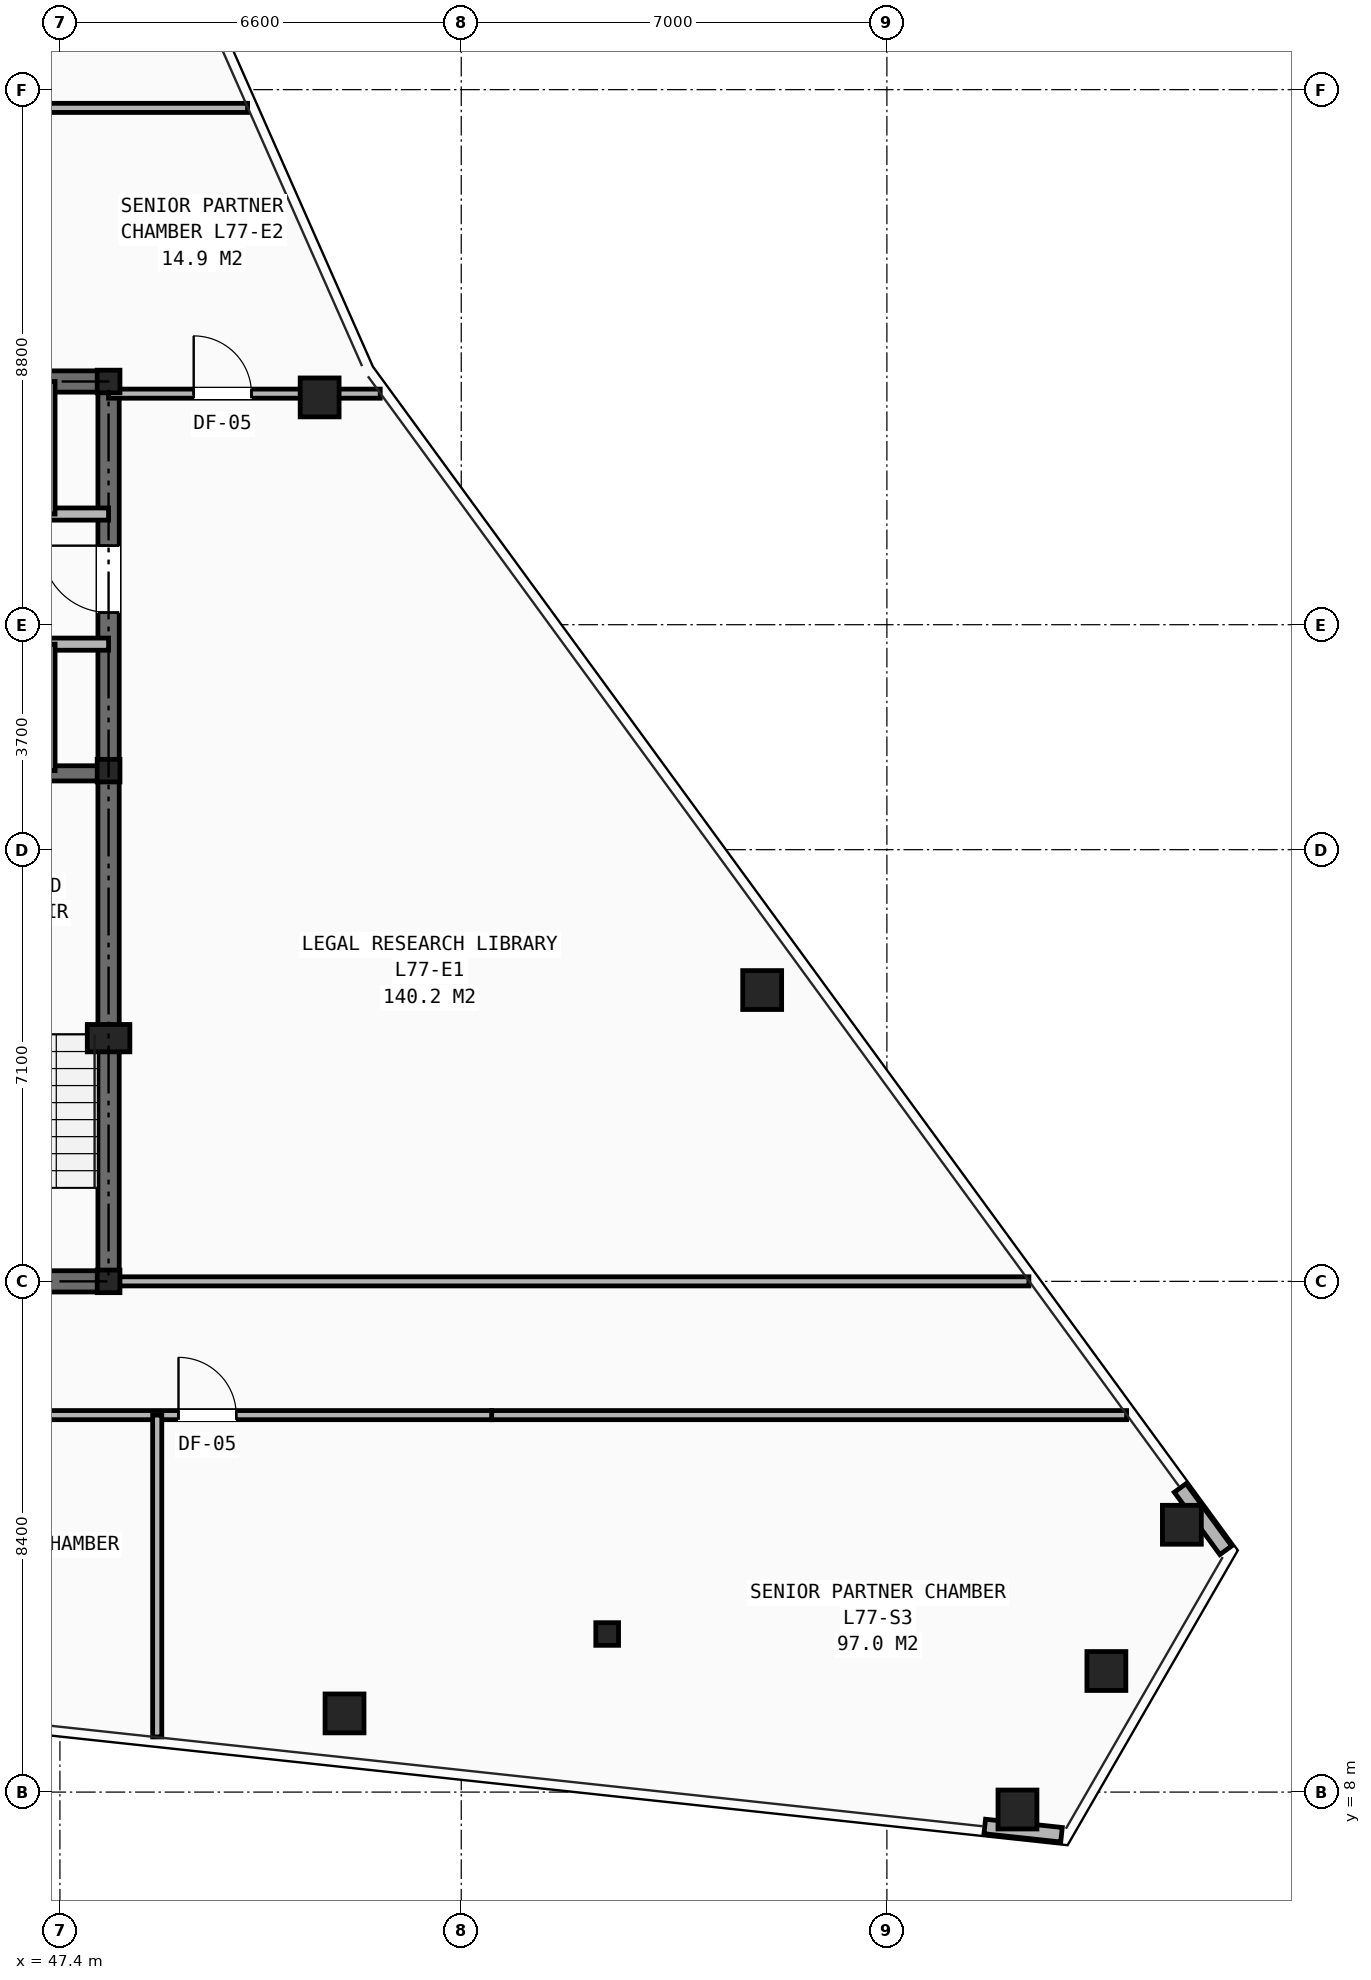
"""IFC4 building model, lengths in metres.
Left out: names, types, materials, properties, quantities, classifications, styles, units other than length and angle.
Written with IfcOpenShell. Run it as: python <this file> out.ifc"""

import sys

from ifc_helpers import new_model, si_unit, direction, frame, frame_2d, origin, origin_2d, place, context, subcontext, project, spatial, rectangle, hollow_rectangle, i_section, extrude, element, fill, save


model = new_model("IFC4")
c1 = context("Model", 3, precision=1e-05, world=origin(), true_north=direction((0.0, 1.0)))
c2 = subcontext(c1, "Body", "Model", "MODEL_VIEW")
j1 = project(units=[si_unit("LENGTHUNIT", "METRE"), si_unit("PLANEANGLEUNIT", "RADIAN")], contexts=[c1])
p1 = place(None, origin())
s1 = spatial("IfcSite", under=j1, at=p1, CompositionType="ELEMENT")
p2 = place(p1, origin())
s2 = spatial("IfcBuilding", under=s1, at=p2, CompositionType="ELEMENT")
p3 = place(p2, frame((0.0, 0.0, 272.5)))
s3 = spatial("IfcBuildingStorey", under=s2, at=p3, CompositionType="ELEMENT", Elevation=272.5)
for number, where, z_axis, x_axis in (
    (1, (48.2, 16.4, 0.0), (0.0, 0.0, 1.0), (1.0, 0.0, 0.0)),
    (2, (48.2, 24.8, 0.0), (0.0, 0.0, 1.0), (1.0, 0.0, 0.0)),
    (3, (48.2, 31.2, 0.0), (0.0, 0.0, 1.0), (1.0, 0.0, 0.0)),
    (4, (56.4, 10.6, 0.0), (0.0, 0.0, 1.0), (1.0, 0.0, 0.0)),
):
    element("IfcColumn", number, at=place(p3, frame(where, z_axis=z_axis, x_axis=x_axis)), inside=s3, PredefinedType="COLUMN", context=c2, shape_type="SweptSolid", body=[
        extrude(i_section(OverallWidth=0.374, OverallDepth=0.372, WebThickness=0.016, FlangeThickness=0.026, at=origin_2d()), origin(), (0.0, 0.0, 1.0), 3.5),
    ])
p4 = place(p3, frame((48.2, 20.4, 0.0), z_axis=(0.0, 0.0, 1.0), x_axis=(1.0, 0.0, 0.0)))
e5 = element("IfcColumn", 5, at=p4, inside=s3, PredefinedType="PILASTER", context=c2, shape_type="SweptSolid", body=[
    extrude(rectangle(XDim=0.7, YDim=0.45, at=origin_2d()), origin(), (0.0, 0.0, 1.0), 3.5),
])
for number, where, z_axis, x_axis in (
    (6, (52.08, 9.294, 0.0), (0.0, 0.0, 1.0), (1.0, 0.0, 0.0)),
    (7, (63.148, 7.714, 0.0), (0.0, 0.0, 1.0), (1.0, 0.0, 0.0)),
    (8, (64.61, 9.991, 0.0), (0.0, 0.0, 1.0), (1.0, 0.0, 0.0)),
    (9, (65.851, 12.397, 0.0), (0.0, 0.0, 1.0), (1.0, 0.0, 0.0)),
    (10, (58.949, 21.191, 0.0), (0.0, 0.0, 1.0), (1.0, 0.0, 0.0)),
    (11, (51.671, 30.938, 0.0), (0.0, 0.0, 1.0), (1.0, 0.0, 0.0)),
):
    element("IfcColumn", number, at=place(p3, frame(where, z_axis=z_axis, x_axis=x_axis)), inside=s3, PredefinedType="COLUMN", context=c2, shape_type="SweptSolid", body=[
        extrude(hollow_rectangle(XDim=0.64, YDim=0.64, WallThickness=0.045, at=origin_2d()), origin(), (0.0, 0.0, 1.0), 3.5),
    ])
for number, where, z_axis, x_axis in (
    (12, (62.61, 7.435, 0.0), (0.0, 0.0, 1.0), (0.994, -0.107, 0.0)),
    (13, (66.573, 11.977, 0.0), (0.0, 0.0, 1.0), (-0.59, 0.807, 0.0)),
):
    element("IfcWall", number, at=place(p3, frame(where, z_axis=z_axis, x_axis=x_axis)), inside=s3, PredefinedType="SHEAR", context=c2, shape_type="SweptSolid", body=[
        extrude(rectangle(XDim=1.269, YDim=0.24, at=frame_2d((0.635, 0.0))), origin(), (0.0, 0.0, 1.0), 2.623),
    ])
p5 = place(p3, frame((31.8, 16.4, 0.0), z_axis=(0.0, 0.0, 1.0), x_axis=(1.0, 0.0, 0.0)))
e14 = element("IfcWall", 14, at=p5, inside=s3, PredefinedType="SHEAR", context=c2, shape_type="SweptSolid", body=[
    extrude(rectangle(XDim=16.4, YDim=0.35, at=frame_2d((8.2, 0.0))), origin(), (0.0, 0.0, 1.0), 3.25),
])
p6 = place(p5, frame((4.2, 0.0, 0.0)))
e15 = element("IfcOpeningElement", 15, at=p6, cuts=e14, PredefinedType="OPENING", context=c2, shape_type="SweptSolid", body=[
    extrude(rectangle(XDim=0.95, YDim=2.1, at=frame_2d((0.475, 1.05))), frame((0.0, 0.185, 0.0), z_axis=(0.0, -1.0, 0.0), x_axis=(1.0, 0.0, 0.0)), (0.0, 0.0, 1.0), 0.37),
])
p7 = place(p5, frame((10.6, 0.0, 0.0)))
e16 = element("IfcOpeningElement", 16, at=p7, cuts=e14, PredefinedType="OPENING", context=c2, shape_type="SweptSolid", body=[
    extrude(rectangle(XDim=0.95, YDim=2.1, at=frame_2d((0.475, 1.05))), frame((0.0, 0.185, 0.0), z_axis=(0.0, -1.0, 0.0), x_axis=(1.0, 0.0, 0.0)), (0.0, 0.0, 1.0), 0.37),
])
p8 = place(p3, frame((31.8, 31.2, 0.0), z_axis=(0.0, 0.0, 1.0), x_axis=(1.0, 0.0, 0.0)))
e17 = element("IfcWall", 17, at=p8, inside=s3, PredefinedType="SHEAR", context=c2, shape_type="SweptSolid", body=[
    extrude(rectangle(XDim=16.4, YDim=0.35, at=frame_2d((8.2, 0.0))), origin(), (0.0, 0.0, 1.0), 3.25),
])
p9 = place(p3, frame((48.2, 16.4, 0.0), z_axis=(0.0, 0.0, 1.0), x_axis=(0.0, 1.0, 0.0)))
e18 = element("IfcWall", 18, at=p9, inside=s3, PredefinedType="SHEAR", context=c2, shape_type="SweptSolid", body=[
    extrude(rectangle(XDim=14.8, YDim=0.35, at=frame_2d((7.4, 0.0))), origin(), (0.0, 0.0, 1.0), 3.25),
])
p10 = place(p9, frame((11.0, 0.0, 0.0)))
e19 = element("IfcOpeningElement", 19, at=p10, cuts=e18, PredefinedType="OPENING", context=c2, shape_type="SweptSolid", body=[
    extrude(rectangle(XDim=1.1, YDim=2.15, at=frame_2d((0.55, 1.075))), frame((0.0, 0.185, 0.0), z_axis=(0.0, -1.0, 0.0), x_axis=(1.0, 0.0, 0.0)), (0.0, 0.0, 1.0), 0.37),
])
p11 = place(p3, frame((44.955, 24.755, 0.0), z_axis=(0.0, 0.0, 1.0), x_axis=(1.0, 0.0, 0.0)))
e20 = element("IfcWall", 20, at=p11, inside=s3, PredefinedType="SHEAR", context=c2, shape_type="SweptSolid", body=[
    extrude(rectangle(XDim=3.245, YDim=0.25, at=frame_2d((1.623, 0.0))), origin(), (0.0, 0.0, 1.0), 3.25),
])
p12 = place(p3, frame((33.82, 29.02, 0.0), z_axis=(0.0, 0.0, 1.0), x_axis=(1.0, 0.0, 0.0)))
e21 = element("IfcWall", 21, at=p12, inside=s3, PredefinedType="SOLIDWALL", context=c2, shape_type="SweptSolid", body=[
    extrude(rectangle(XDim=14.38, YDim=0.2, at=frame_2d((7.19, 0.0))), origin(), (0.0, 0.0, 1.0), 2.705),
])
p13 = place(p12, frame((3.92, 0.0, 0.0)))
e22 = element("IfcOpeningElement", 22, at=p13, cuts=e21, PredefinedType="OPENING", context=c2, shape_type="SweptSolid", body=[
    extrude(rectangle(XDim=0.9, YDim=2.1, at=frame_2d((0.45, 1.05))), frame((0.0, 0.11, 0.0), z_axis=(0.0, -1.0, 0.0), x_axis=(1.0, 0.0, 0.0)), (0.0, 0.0, 1.0), 0.22),
])
p14 = place(p12, frame((9.39, 0.0, 0.0)))
e23 = element("IfcOpeningElement", 23, at=p14, cuts=e21, PredefinedType="OPENING", context=c2, shape_type="SweptSolid", body=[
    extrude(rectangle(XDim=1.1, YDim=2.15, at=frame_2d((0.55, 1.075))), frame((0.0, 0.11, 0.0), z_axis=(0.0, -1.0, 0.0), x_axis=(1.0, 0.0, 0.0)), (0.0, 0.0, 1.0), 0.22),
])
p15 = place(p12, frame((11.71, 0.0, 0.0)))
e24 = element("IfcOpeningElement", 24, at=p15, cuts=e21, PredefinedType="OPENING", context=c2, shape_type="SweptSolid", body=[
    extrude(rectangle(XDim=1.1, YDim=2.15, at=frame_2d((0.55, 1.075))), frame((0.0, 0.11, 0.0), z_axis=(0.0, -1.0, 0.0), x_axis=(1.0, 0.0, 0.0)), (0.0, 0.0, 1.0), 0.22),
])
p16 = place(p3, frame((33.82, 26.88, 0.0), z_axis=(0.0, 0.0, 1.0), x_axis=(1.0, 0.0, 0.0)))
e25 = element("IfcWall", 25, at=p16, inside=s3, PredefinedType="SOLIDWALL", context=c2, shape_type="SweptSolid", body=[
    extrude(rectangle(XDim=14.38, YDim=0.2, at=frame_2d((7.19, 0.0))), origin(), (0.0, 0.0, 1.0), 2.705),
])
p17 = place(p16, frame((1.78, 0.0, 0.0)))
e26 = element("IfcOpeningElement", 26, at=p17, cuts=e25, PredefinedType="OPENING", context=c2, shape_type="SweptSolid", body=[
    extrude(rectangle(XDim=0.9, YDim=2.1, at=frame_2d((0.45, 1.05))), frame((0.0, 0.11, 0.0), z_axis=(0.0, -1.0, 0.0), x_axis=(1.0, 0.0, 0.0)), (0.0, 0.0, 1.0), 0.22),
])
p18 = place(p16, frame((6.07, 0.0, 0.0)))
e27 = element("IfcOpeningElement", 27, at=p18, cuts=e25, PredefinedType="OPENING", context=c2, shape_type="SweptSolid", body=[
    extrude(rectangle(XDim=0.9, YDim=2.1, at=frame_2d((0.45, 1.05))), frame((0.0, 0.11, 0.0), z_axis=(0.0, -1.0, 0.0), x_axis=(1.0, 0.0, 0.0)), (0.0, 0.0, 1.0), 0.22),
])
p19 = place(p16, frame((9.39, 0.0, 0.0)))
e28 = element("IfcOpeningElement", 28, at=p19, cuts=e25, PredefinedType="OPENING", context=c2, shape_type="SweptSolid", body=[
    extrude(rectangle(XDim=1.1, YDim=2.15, at=frame_2d((0.55, 1.075))), frame((0.0, 0.11, 0.0), z_axis=(0.0, -1.0, 0.0), x_axis=(1.0, 0.0, 0.0)), (0.0, 0.0, 1.0), 0.22),
])
p20 = place(p16, frame((11.71, 0.0, 0.0)))
e29 = element("IfcOpeningElement", 29, at=p20, cuts=e25, PredefinedType="OPENING", context=c2, shape_type="SweptSolid", body=[
    extrude(rectangle(XDim=1.1, YDim=2.15, at=frame_2d((0.55, 1.075))), frame((0.0, 0.11, 0.0), z_axis=(0.0, -1.0, 0.0), x_axis=(1.0, 0.0, 0.0)), (0.0, 0.0, 1.0), 0.22),
])
p21 = place(p3, frame((47.24, 29.02, 0.0), z_axis=(0.0, 0.0, 1.0), x_axis=(0.0, 1.0, 0.0)))
e30 = element("IfcWall", 30, at=p21, inside=s3, PredefinedType="SOLIDWALL", context=c2, shape_type="SweptSolid", body=[
    extrude(rectangle(XDim=2.18, YDim=0.16, at=frame_2d((1.09, 0.0))), origin(), (0.0, 0.0, 1.0), 2.705),
])
p22 = place(p3, frame((47.24, 24.8, 0.0), z_axis=(0.0, 0.0, 1.0), x_axis=(0.0, 1.0, 0.0)))
e31 = element("IfcWall", 31, at=p22, inside=s3, PredefinedType="SOLIDWALL", context=c2, shape_type="SweptSolid", body=[
    extrude(rectangle(XDim=2.08, YDim=0.16, at=frame_2d((1.04, 0.0))), origin(), (0.0, 0.0, 1.0), 3.25),
])
p23 = place(p3, frame((54.5, 14.2, 0.0), z_axis=(0.0, 0.0, 1.0), x_axis=(1.0, 0.0, 0.0)))
e32 = element("IfcWall", 32, at=p23, inside=s3, PredefinedType="PARTITIONING", context=c2, shape_type="SweptSolid", body=[
    extrude(rectangle(XDim=10.443, YDim=0.15, at=frame_2d((5.221, 0.0))), origin(), (0.0, 0.0, 1.0), 2.265),
])
p24 = place(p3, frame((48.2, 16.4, 0.0), z_axis=(0.0, 0.0, 1.0), x_axis=(1.0, 0.0, 0.0)))
e33 = element("IfcWall", 33, at=p24, inside=s3, PredefinedType="PARTITIONING", context=c2, shape_type="SweptSolid", body=[
    extrude(rectangle(XDim=15.135, YDim=0.15, at=frame_2d((7.568, 0.0))), origin(), (0.0, 0.0, 1.0), 2.265),
])
p25 = place(p3, frame((25.5, 14.2, 0.0), z_axis=(0.0, 0.0, 1.0), x_axis=(1.0, 0.0, 0.0)))
e34 = element("IfcWall", 34, at=p25, inside=s3, PredefinedType="PARTITIONING", context=c2, shape_type="SweptSolid", body=[
    extrude(rectangle(XDim=29.0, YDim=0.15, at=frame_2d((14.5, 0.0))), origin(), (0.0, 0.0, 1.0), 2.265),
])
p26 = place(p25, frame((0.85, 0.0, 0.0)))
e35 = element("IfcOpeningElement", 35, at=p26, cuts=e34, PredefinedType="OPENING", context=c2, shape_type="SweptSolid", body=[
    extrude(rectangle(XDim=0.95, YDim=2.1, at=frame_2d((0.475, 1.05))), frame((0.0, 0.085, 0.0), z_axis=(0.0, -1.0, 0.0), x_axis=(1.0, 0.0, 0.0)), (0.0, 0.0, 1.0), 0.17),
])
p27 = place(p25, frame((5.85, 0.0, 0.0)))
e36 = element("IfcOpeningElement", 36, at=p27, cuts=e34, PredefinedType="OPENING", context=c2, shape_type="SweptSolid", body=[
    extrude(rectangle(XDim=0.95, YDim=2.1, at=frame_2d((0.475, 1.05))), frame((0.0, 0.085, 0.0), z_axis=(0.0, -1.0, 0.0), x_axis=(1.0, 0.0, 0.0)), (0.0, 0.0, 1.0), 0.17),
])
p28 = place(p25, frame((23.85, 0.0, 0.0)))
e37 = element("IfcOpeningElement", 37, at=p28, cuts=e34, PredefinedType="OPENING", context=c2, shape_type="SweptSolid", body=[
    extrude(rectangle(XDim=0.95, YDim=2.1, at=frame_2d((0.475, 1.05))), frame((0.0, 0.085, 0.0), z_axis=(0.0, -1.0, 0.0), x_axis=(1.0, 0.0, 0.0)), (0.0, 0.0, 1.0), 0.17),
])
p29 = place(p3, frame((49.0, 8.907, 0.0), z_axis=(0.0, 0.0, 1.0), x_axis=(0.0, 1.0, 0.0)))
e38 = element("IfcWall", 38, at=p29, inside=s3, PredefinedType="PARTITIONING", context=c2, shape_type="SweptSolid", body=[
    extrude(rectangle(XDim=5.293, YDim=0.15, at=frame_2d((2.646, 0.0))), origin(), (0.0, 0.0, 1.0), 2.628),
])
p30 = place(p3, frame((46.8, 35.7, 0.0), z_axis=(0.0, 0.0, 1.0), x_axis=(1.0, 0.0, 0.0)))
e39 = element("IfcWall", 39, at=p30, inside=s3, PredefinedType="PARTITIONING", context=c2, shape_type="SweptSolid", body=[
    extrude(rectangle(XDim=3.686, YDim=0.15, at=frame_2d((1.843, 0.0))), origin(), (0.0, 0.0, 1.0), 2.628),
])
p31 = place(p3, frame((48.2, 31.0, 0.0), z_axis=(0.0, 0.0, 1.0), x_axis=(1.0, 0.0, 0.0)))
e40 = element("IfcWall", 40, at=p31, inside=s3, PredefinedType="PARTITIONING", context=c2, shape_type="SweptSolid", body=[
    extrude(rectangle(XDim=4.468, YDim=0.15, at=frame_2d((2.234, 0.0))), origin(), (0.0, 0.0, 1.0), 2.265),
])
p32 = place(p31, frame((1.4, 0.0, 0.0)))
e41 = element("IfcOpeningElement", 41, at=p32, cuts=e40, PredefinedType="OPENING", context=c2, shape_type="SweptSolid", body=[
    extrude(rectangle(XDim=0.95, YDim=2.1, at=frame_2d((0.475, 1.05))), frame((0.0, 0.085, 0.0), z_axis=(0.0, -1.0, 0.0), x_axis=(1.0, 0.0, 0.0)), (0.0, 0.0, 1.0), 0.17),
])
p33 = place(p10, origin())
e42 = element("IfcDoor", 42, at=p33, inside=s3, OperationType="SINGLE_SWING_RIGHT", PredefinedType="DOOR", context=c2, shape_type="SweptSolid", body=[
    extrude(rectangle(XDim=1.1, YDim=2.15, at=frame_2d((0.55, 1.075))), frame((0.0, 0.025, 0.0), z_axis=(0.0, -1.0, 0.0), x_axis=(1.0, 0.0, 0.0)), (0.0, 0.0, 1.0), 0.05),
])
fill(e19, e42)
p34 = place(p28, origin())
e43 = element("IfcDoor", 43, at=p34, inside=s3, OperationType="SINGLE_SWING_LEFT", PredefinedType="DOOR", context=c2, shape_type="SweptSolid", body=[
    extrude(rectangle(XDim=0.95, YDim=2.1, at=frame_2d((0.475, 1.05))), frame((0.0, 0.025, 0.0), z_axis=(0.0, -1.0, 0.0), x_axis=(1.0, 0.0, 0.0)), (0.0, 0.0, 1.0), 0.05),
])
fill(e37, e43)
p35 = place(p32, origin())
e44 = element("IfcDoor", 44, at=p35, inside=s3, OperationType="SINGLE_SWING_LEFT", PredefinedType="DOOR", context=c2, shape_type="SweptSolid", body=[
    extrude(rectangle(XDim=0.95, YDim=2.1, at=frame_2d((0.475, 1.05))), frame((0.0, 0.025, 0.0), z_axis=(0.0, -1.0, 0.0), x_axis=(1.0, 0.0, 0.0)), (0.0, 0.0, 1.0), 0.05),
])
fill(e41, e44)
save(model, sys.argv[1])
